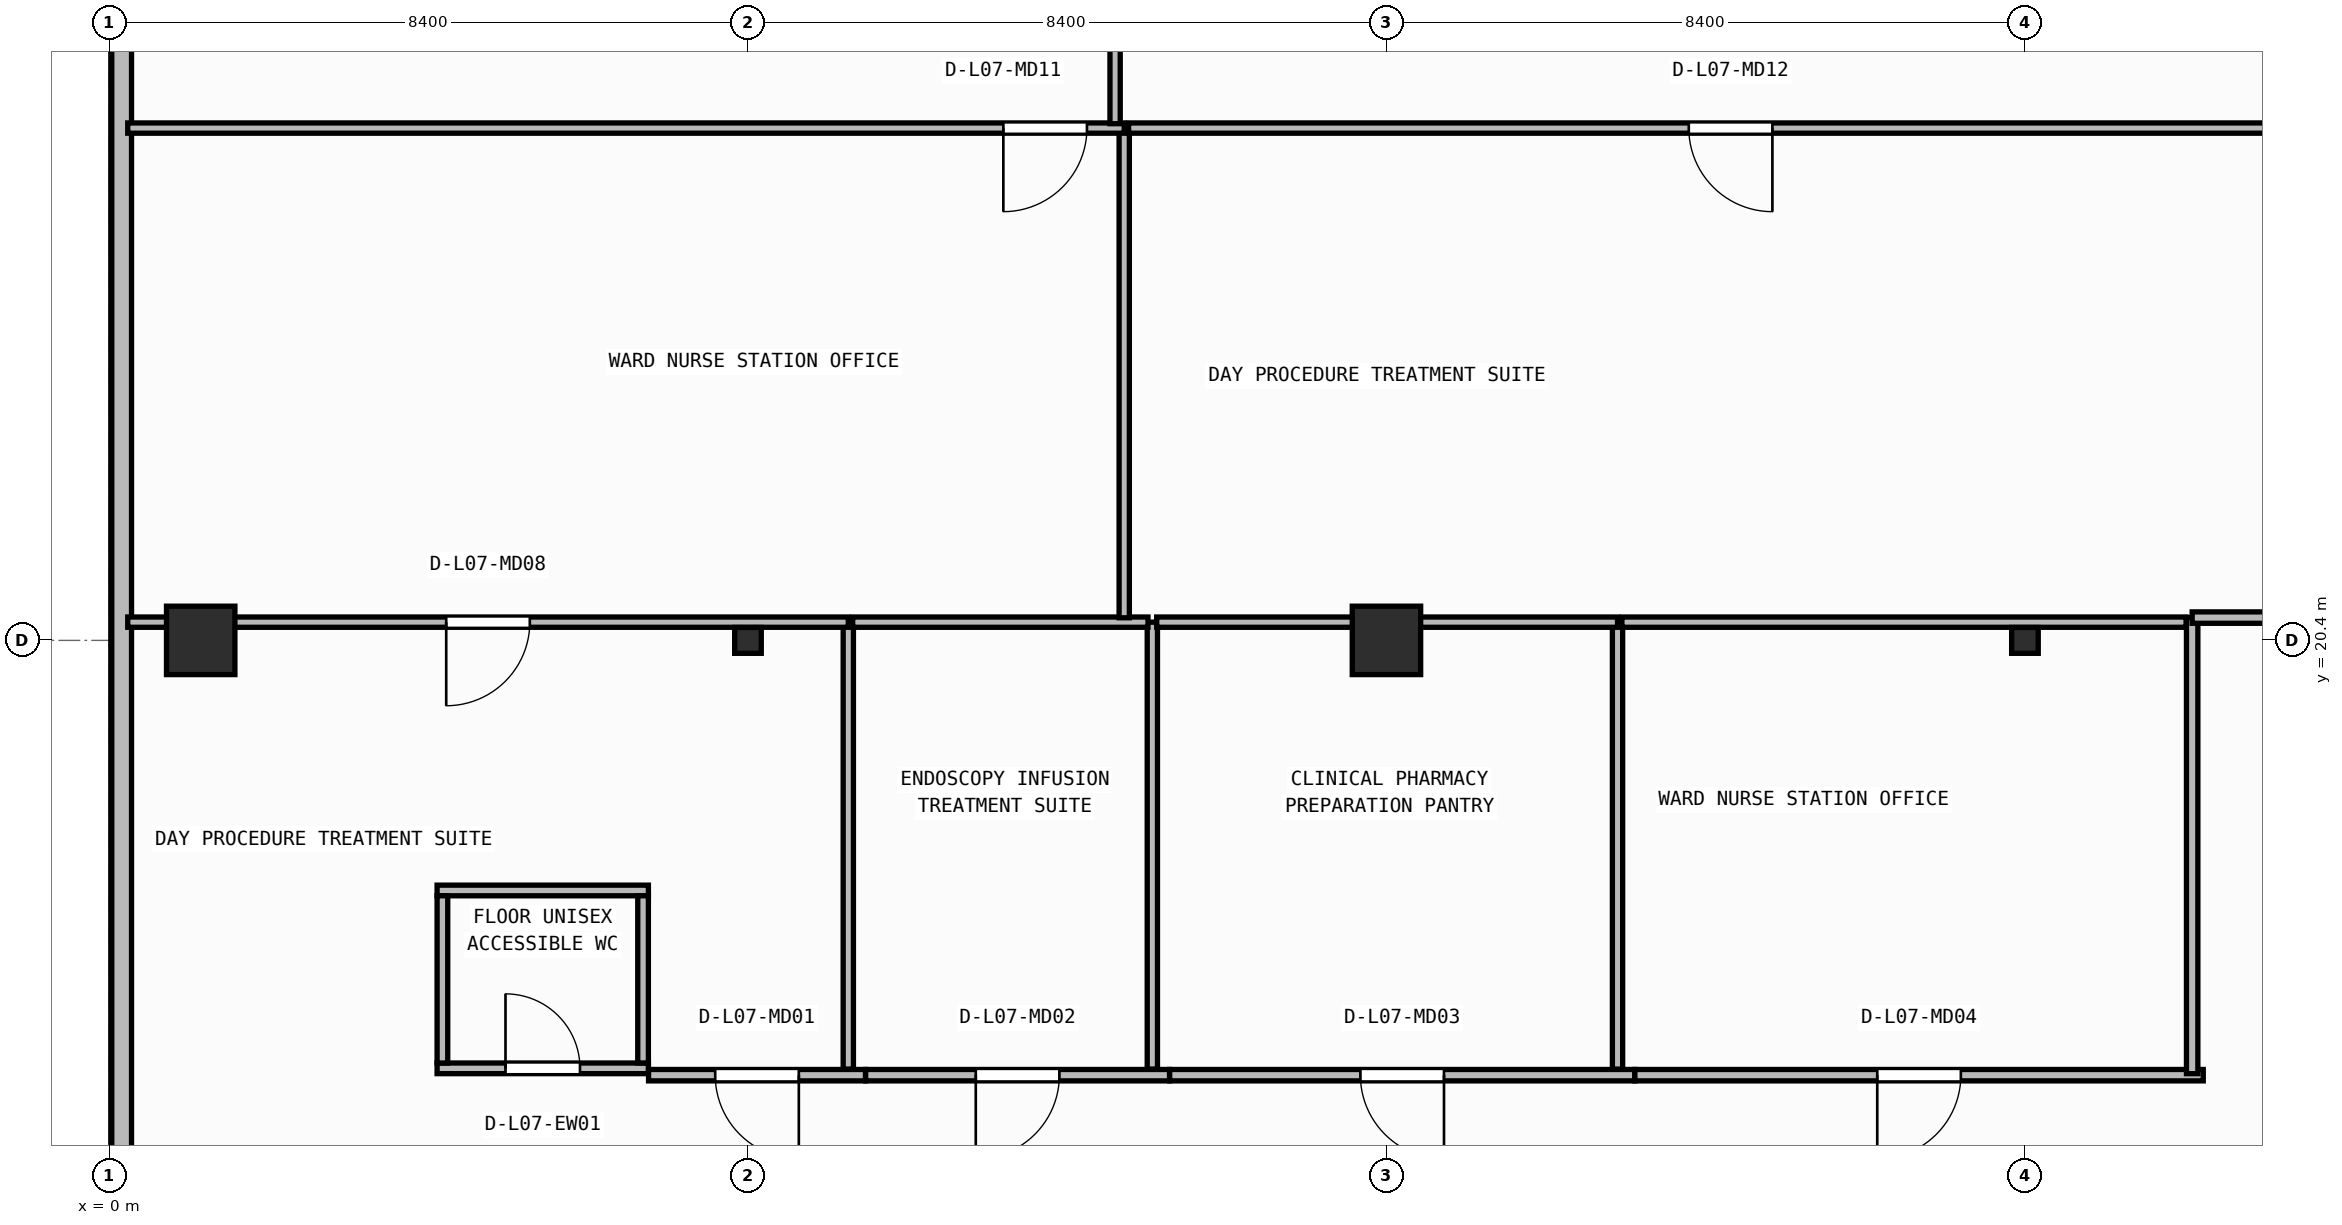
"""IFC4 building model, lengths in metres.
Left out: names, types, materials, properties, quantities, classifications, styles, units other than length and angle.
Written with IfcOpenShell. Run it as: python <this file> out.ifc"""

import sys

from ifc_helpers import new_model, si_unit, direction, frame, frame_2d, origin, origin_2d, place, context, subcontext, project, spatial, rectangle, i_section, extrude, element, fill, save


model = new_model("IFC4")
c1 = context("Model", 3, precision=1e-05, world=origin(), true_north=direction((0.0, 1.0)))
c2 = subcontext(c1, "Body", "Model", "MODEL_VIEW")
j1 = project(units=[si_unit("LENGTHUNIT", "METRE"), si_unit("PLANEANGLEUNIT", "RADIAN")], contexts=[c1])
p1 = place(None, origin())
s1 = spatial("IfcSite", under=j1, at=p1, CompositionType="ELEMENT")
p2 = place(p1, origin())
s2 = spatial("IfcBuilding", under=s1, at=p2, CompositionType="ELEMENT")
p3 = place(p2, frame((0.0, 0.0, 30.4)))
s3 = spatial("IfcBuildingStorey", under=s2, at=p3, CompositionType="ELEMENT", Elevation=30.4)
p4 = place(p3, frame((1.2, 20.4, 0.0), z_axis=(0.0, 0.0, 1.0), x_axis=(1.0, 0.0, 0.0)))
e1 = element("IfcColumn", 1, at=p4, inside=s3, PredefinedType="COLUMN", context=c2, shape_type="SweptSolid", body=[
    extrude(rectangle(XDim=0.9, YDim=0.9, at=origin_2d()), origin(), (0.0, 0.0, 1.0), 3.95),
])
p5 = place(p3, frame((8.4, 20.4, 0.0), z_axis=(0.0, 0.0, 1.0), x_axis=(1.0, 0.0, 0.0)))
e2 = element("IfcColumn", 2, at=p5, inside=s3, PredefinedType="COLUMN", context=c2, shape_type="SweptSolid", body=[
    extrude(i_section(OverallWidth=0.35, OverallDepth=0.34, WebThickness=0.016, FlangeThickness=0.028, at=origin_2d()), origin(), (0.0, 0.0, 1.0), 3.95),
])
p6 = place(p3, frame((16.8, 20.4, 0.0), z_axis=(0.0, 0.0, 1.0), x_axis=(1.0, 0.0, 0.0)))
e3 = element("IfcColumn", 3, at=p6, inside=s3, PredefinedType="COLUMN", context=c2, shape_type="SweptSolid", body=[
    extrude(rectangle(XDim=0.9, YDim=0.9, at=origin_2d()), origin(), (0.0, 0.0, 1.0), 3.95),
])
p7 = place(p3, frame((25.2, 20.4, 0.0), z_axis=(0.0, 0.0, 1.0), x_axis=(1.0, 0.0, 0.0)))
e4 = element("IfcColumn", 4, at=p7, inside=s3, PredefinedType="COLUMN", context=c2, shape_type="SweptSolid", body=[
    extrude(i_section(OverallWidth=0.35, OverallDepth=0.34, WebThickness=0.016, FlangeThickness=0.028, at=origin_2d()), origin(), (0.0, 0.0, 1.0), 3.95),
])
p8 = place(p3, frame((0.16, 41.04, 0.0), z_axis=(0.0, 0.0, 1.0), x_axis=(0.0, -1.0, 0.0)))
e5 = element("IfcWall", 5, at=p8, inside=s3, PredefinedType="STANDARD", context=c2, shape_type="SweptSolid", body=[
    extrude(rectangle(XDim=38.28, YDim=0.26, at=frame_2d((19.14, 0.0))), origin(), (0.0, 0.0, 1.0), 3.71),
])
p9 = place(p8, frame((28.15, 0.0, 0.9)))
e6 = element("IfcOpeningElement", 6, at=p9, cuts=e5, PredefinedType="OPENING", context=c2, shape_type="SweptSolid", body=[
    extrude(rectangle(XDim=2.4, YDim=1.65, at=frame_2d((1.2, 0.825))), frame((0.0, 0.14, 0.0), z_axis=(0.0, -1.0, 0.0), x_axis=(1.0, 0.0, 0.0)), (0.0, 0.0, 1.0), 0.28),
])
p10 = place(p3, frame((4.31, 14.77, 0.0), z_axis=(0.0, 0.0, 1.0), x_axis=(1.0, 0.0, 0.0)))
e7 = element("IfcWall", 7, at=p10, inside=s3, PredefinedType="PARTITIONING", context=c2, shape_type="SweptSolid", body=[
    extrude(rectangle(XDim=2.78, YDim=0.14, at=frame_2d((1.39, 0.0))), origin(), (0.0, 0.0, 1.0), 3.71),
])
p11 = place(p10, frame((0.9, 0.0, 0.0)))
e8 = element("IfcOpeningElement", 8, at=p11, cuts=e7, PredefinedType="OPENING", context=c2, shape_type="SweptSolid", body=[
    extrude(rectangle(XDim=0.98, YDim=2.1, at=frame_2d((0.49, 1.05))), frame((0.0, 0.08, 0.0), z_axis=(0.0, -1.0, 0.0), x_axis=(1.0, 0.0, 0.0)), (0.0, 0.0, 1.0), 0.16),
])
p12 = place(p3, frame((4.31, 17.11, 0.0), z_axis=(0.0, 0.0, 1.0), x_axis=(1.0, 0.0, 0.0)))
e9 = element("IfcWall", 9, at=p12, inside=s3, PredefinedType="PARTITIONING", context=c2, shape_type="SweptSolid", body=[
    extrude(rectangle(XDim=2.78, YDim=0.14, at=frame_2d((1.39, 0.0))), origin(), (0.0, 0.0, 1.0), 3.71),
])
for number, where, z_axis, x_axis in (
    (10, (4.38, 14.84, 0.0), (0.0, 0.0, 1.0), (0.0, 1.0, 0.0)),
    (11, (7.02, 14.84, 0.0), (0.0, 0.0, 1.0), (0.0, 1.0, 0.0)),
):
    element("IfcWall", number, at=place(p3, frame(where, z_axis=z_axis, x_axis=x_axis)), inside=s3, PredefinedType="PARTITIONING", context=c2, shape_type="SweptSolid", body=[
        extrude(rectangle(XDim=2.2, YDim=0.14, at=frame_2d((1.1, 0.0))), origin(), (0.0, 0.0, 1.0), 3.71),
    ])
p13 = place(p3, frame((9.946, 14.68, 0.0), z_axis=(0.0, 0.0, 1.0), x_axis=(-1.0, 0.0, 0.0)))
e12 = element("IfcWall", 12, at=p13, inside=s3, PredefinedType="PARTITIONING", context=c2, shape_type="SweptSolid", body=[
    extrude(rectangle(XDim=2.854, YDim=0.15, at=frame_2d((1.427, 0.0))), origin(), (0.0, 0.0, 1.0), 3.71),
])
p14 = place(p13, frame((0.877, 0.0, 0.0)))
e13 = element("IfcOpeningElement", 13, at=p14, cuts=e12, PredefinedType="OPENING", context=c2, shape_type="SweptSolid", body=[
    extrude(rectangle(XDim=1.1, YDim=2.1, at=frame_2d((0.55, 1.05))), frame((0.0, 0.085, 0.0), z_axis=(0.0, -1.0, 0.0), x_axis=(1.0, 0.0, 0.0)), (0.0, 0.0, 1.0), 0.17),
])
p15 = place(p3, frame((13.946, 14.68, 0.0), z_axis=(0.0, 0.0, 1.0), x_axis=(-1.0, 0.0, 0.0)))
e14 = element("IfcWall", 14, at=p15, inside=s3, PredefinedType="PARTITIONING", context=c2, shape_type="SweptSolid", body=[
    extrude(rectangle(XDim=3.998, YDim=0.15, at=frame_2d((1.999, 0.0))), origin(), (0.0, 0.0, 1.0), 3.71),
])
p16 = place(p15, frame((1.449, 0.0, 0.0)))
e15 = element("IfcOpeningElement", 15, at=p16, cuts=e14, PredefinedType="OPENING", context=c2, shape_type="SweptSolid", body=[
    extrude(rectangle(XDim=1.1, YDim=2.1, at=frame_2d((0.55, 1.05))), frame((0.0, 0.085, 0.0), z_axis=(0.0, -1.0, 0.0), x_axis=(1.0, 0.0, 0.0)), (0.0, 0.0, 1.0), 0.17),
])
p17 = place(p3, frame((20.066, 14.68, 0.0), z_axis=(0.0, 0.0, 1.0), x_axis=(-1.0, 0.0, 0.0)))
e16 = element("IfcWall", 16, at=p17, inside=s3, PredefinedType="PARTITIONING", context=c2, shape_type="SweptSolid", body=[
    extrude(rectangle(XDim=6.118, YDim=0.15, at=frame_2d((3.059, 0.0))), origin(), (0.0, 0.0, 1.0), 3.71),
])
p18 = place(p17, frame((2.509, 0.0, 0.0)))
e17 = element("IfcOpeningElement", 17, at=p18, cuts=e16, PredefinedType="OPENING", context=c2, shape_type="SweptSolid", body=[
    extrude(rectangle(XDim=1.1, YDim=2.1, at=frame_2d((0.55, 1.05))), frame((0.0, 0.085, 0.0), z_axis=(0.0, -1.0, 0.0), x_axis=(1.0, 0.0, 0.0)), (0.0, 0.0, 1.0), 0.17),
])
p19 = place(p3, frame((27.546, 14.68, 0.0), z_axis=(0.0, 0.0, 1.0), x_axis=(-1.0, 0.0, 0.0)))
e18 = element("IfcWall", 18, at=p19, inside=s3, PredefinedType="PARTITIONING", context=c2, shape_type="SweptSolid", body=[
    extrude(rectangle(XDim=7.478, YDim=0.15, at=frame_2d((3.739, 0.0))), origin(), (0.0, 0.0, 1.0), 3.71),
])
p20 = place(p19, frame((3.189, 0.0, 0.0)))
e19 = element("IfcOpeningElement", 19, at=p20, cuts=e18, PredefinedType="OPENING", context=c2, shape_type="SweptSolid", body=[
    extrude(rectangle(XDim=1.1, YDim=2.1, at=frame_2d((0.55, 1.05))), frame((0.0, 0.085, 0.0), z_axis=(0.0, -1.0, 0.0), x_axis=(1.0, 0.0, 0.0)), (0.0, 0.0, 1.0), 0.17),
])
p21 = place(p3, frame((27.4, 20.7, 0.0), z_axis=(0.0, 0.0, 1.0), x_axis=(0.0, -1.0, 0.0)))
e20 = element("IfcWall", 20, at=p21, inside=s3, PredefinedType="PARTITIONING", context=c2, shape_type="SweptSolid", body=[
    extrude(rectangle(XDim=6.0, YDim=0.15, at=frame_2d((3.0, 0.0))), origin(), (0.0, 0.0, 1.0), 3.71),
])
p22 = place(p3, frame((29.9, 20.7, 0.0), z_axis=(0.0, 0.0, 1.0), x_axis=(-1.0, 0.0, 0.0)))
e21 = element("IfcWall", 21, at=p22, inside=s3, PredefinedType="PARTITIONING", context=c2, shape_type="SweptSolid", body=[
    extrude(rectangle(XDim=2.5, YDim=0.15, at=frame_2d((1.25, 0.0))), origin(), (0.0, 0.0, 1.0), 3.073),
])
p23 = place(p22, frame((0.225, 0.0, 0.0)))
e22 = element("IfcOpeningElement", 22, at=p23, cuts=e21, PredefinedType="OPENING", context=c2, shape_type="SweptSolid", body=[
    extrude(rectangle(XDim=1.1, YDim=2.1, at=frame_2d((0.55, 1.05))), frame((0.0, 0.085, 0.0), z_axis=(0.0, -1.0, 0.0), x_axis=(1.0, 0.0, 0.0)), (0.0, 0.0, 1.0), 0.17),
])
p24 = place(p3, frame((9.72, 14.76, 0.0), z_axis=(0.0, 0.0, 1.0), x_axis=(0.0, 1.0, 0.0)))
e23 = element("IfcWall", 23, at=p24, inside=s3, PredefinedType="PARTITIONING", context=c2, shape_type="SweptSolid", body=[
    extrude(rectangle(XDim=5.88, YDim=0.135, at=frame_2d((2.94, 0.0))), origin(), (0.0, 0.0, 1.0), 3.71),
])
p25 = place(p3, frame((9.72, 20.64, 0.0), z_axis=(0.0, 0.0, 1.0), x_axis=(-1.0, 0.0, 0.0)))
e24 = element("IfcWall", 24, at=p25, inside=s3, PredefinedType="PARTITIONING", context=c2, shape_type="SweptSolid", body=[
    extrude(rectangle(XDim=9.48, YDim=0.135, at=frame_2d((4.74, 0.0))), origin(), (0.0, 0.0, 1.0), 3.073),
])
p26 = place(p25, frame((4.19, 0.0, 0.0)))
e25 = element("IfcOpeningElement", 25, at=p26, cuts=e24, PredefinedType="OPENING", context=c2, shape_type="SweptSolid", body=[
    extrude(rectangle(XDim=1.1, YDim=2.1, at=frame_2d((0.55, 1.05))), frame((0.0, 0.077, 0.0), z_axis=(0.0, -1.0, 0.0), x_axis=(1.0, 0.0, 0.0)), (0.0, 0.0, 1.0), 0.155),
])
p27 = place(p3, frame((13.72, 14.76, 0.0), z_axis=(0.0, 0.0, 1.0), x_axis=(0.0, 1.0, 0.0)))
e26 = element("IfcWall", 26, at=p27, inside=s3, PredefinedType="PARTITIONING", context=c2, shape_type="SweptSolid", body=[
    extrude(rectangle(XDim=5.88, YDim=0.135, at=frame_2d((2.94, 0.0))), origin(), (0.0, 0.0, 1.0), 3.71),
])
p28 = place(p3, frame((13.663, 20.64, 0.0), z_axis=(0.0, 0.0, 1.0), x_axis=(-1.0, 0.0, 0.0)))
e27 = element("IfcWall", 27, at=p28, inside=s3, PredefinedType="PARTITIONING", context=c2, shape_type="SweptSolid", body=[
    extrude(rectangle(XDim=3.885, YDim=0.135, at=frame_2d((1.942, 0.0))), origin(), (0.0, 0.0, 1.0), 3.073),
])
p29 = place(p3, frame((19.84, 14.76, 0.0), z_axis=(0.0, 0.0, 1.0), x_axis=(0.0, 1.0, 0.0)))
e28 = element("IfcWall", 28, at=p29, inside=s3, PredefinedType="PARTITIONING", context=c2, shape_type="SweptSolid", body=[
    extrude(rectangle(XDim=5.88, YDim=0.135, at=frame_2d((2.94, 0.0))), origin(), (0.0, 0.0, 1.0), 3.71),
])
p30 = place(p3, frame((19.84, 20.64, 0.0), z_axis=(0.0, 0.0, 1.0), x_axis=(-1.0, 0.0, 0.0)))
e29 = element("IfcWall", 29, at=p30, inside=s3, PredefinedType="PARTITIONING", context=c2, shape_type="SweptSolid", body=[
    extrude(rectangle(XDim=6.062, YDim=0.135, at=frame_2d((3.031, 0.0))), origin(), (0.0, 0.0, 1.0), 3.073),
])
p31 = place(p3, frame((27.32, 20.64, 0.0), z_axis=(0.0, 0.0, 1.0), x_axis=(-1.0, 0.0, 0.0)))
e30 = element("IfcWall", 30, at=p31, inside=s3, PredefinedType="PARTITIONING", context=c2, shape_type="SweptSolid", body=[
    extrude(rectangle(XDim=7.423, YDim=0.135, at=frame_2d((3.711, 0.0))), origin(), (0.0, 0.0, 1.0), 3.073),
])
p32 = place(p3, frame((13.35, 20.698, 0.0), z_axis=(0.0, 0.0, 1.0), x_axis=(0.0, 1.0, 0.0)))
e31 = element("IfcWall", 31, at=p32, inside=s3, PredefinedType="PARTITIONING", context=c2, shape_type="SweptSolid", body=[
    extrude(rectangle(XDim=6.442, YDim=0.135, at=frame_2d((3.221, 0.0))), origin(), (0.0, 0.0, 1.0), 3.71),
])
p33 = place(p3, frame((13.35, 27.14, 0.0), z_axis=(0.0, 0.0, 1.0), x_axis=(-1.0, 0.0, 0.0)))
e32 = element("IfcWall", 32, at=p33, inside=s3, PredefinedType="PARTITIONING", context=c2, shape_type="SweptSolid", body=[
    extrude(rectangle(XDim=13.11, YDim=0.135, at=frame_2d((6.555, 0.0))), origin(), (0.0, 0.0, 1.0), 3.71),
])
p34 = place(p33, frame((0.49, 0.0, 0.0)))
e33 = element("IfcOpeningElement", 33, at=p34, cuts=e32, PredefinedType="OPENING", context=c2, shape_type="SweptSolid", body=[
    extrude(rectangle(XDim=1.1, YDim=2.1, at=frame_2d((0.55, 1.05))), frame((0.0, 0.077, 0.0), z_axis=(0.0, -1.0, 0.0), x_axis=(1.0, 0.0, 0.0)), (0.0, 0.0, 1.0), 0.155),
])
p35 = place(p3, frame((29.248, 27.14, 0.0), z_axis=(0.0, 0.0, 1.0), x_axis=(-1.0, 0.0, 0.0)))
e34 = element("IfcWall", 34, at=p35, inside=s3, PredefinedType="PARTITIONING", context=c2, shape_type="SweptSolid", body=[
    extrude(rectangle(XDim=15.84, YDim=0.135, at=frame_2d((7.92, 0.0))), origin(), (0.0, 0.0, 1.0), 3.71),
])
p36 = place(p35, frame((7.37, 0.0, 0.0)))
e35 = element("IfcOpeningElement", 35, at=p36, cuts=e34, PredefinedType="OPENING", context=c2, shape_type="SweptSolid", body=[
    extrude(rectangle(XDim=1.1, YDim=2.1, at=frame_2d((0.55, 1.05))), frame((0.0, 0.077, 0.0), z_axis=(0.0, -1.0, 0.0), x_axis=(1.0, 0.0, 0.0)), (0.0, 0.0, 1.0), 0.155),
])
p37 = place(p3, frame((13.23, 27.198, 0.0), z_axis=(0.0, 0.0, 1.0), x_axis=(0.0, 1.0, 0.0)))
e36 = element("IfcWall", 36, at=p37, inside=s3, PredefinedType="PARTITIONING", context=c2, shape_type="SweptSolid", body=[
    extrude(rectangle(XDim=9.536, YDim=0.135, at=frame_2d((4.768, 0.0))), origin(), (0.0, 0.0, 1.0), 3.71),
])
p38 = place(p11, origin())
e37 = element("IfcDoor", 37, at=p38, inside=s3, OperationType="SINGLE_SWING_LEFT", PredefinedType="DOOR", context=c2, shape_type="SweptSolid", body=[
    extrude(rectangle(XDim=0.98, YDim=2.1, at=frame_2d((0.49, 1.05))), frame((0.0, 0.025, 0.0), z_axis=(0.0, -1.0, 0.0), x_axis=(1.0, 0.0, 0.0)), (0.0, 0.0, 1.0), 0.05),
])
fill(e8, e37)
p39 = place(p14, origin())
e38 = element("IfcDoor", 38, at=p39, inside=s3, OperationType="SINGLE_SWING_LEFT", PredefinedType="DOOR", context=c2, shape_type="SweptSolid", body=[
    extrude(rectangle(XDim=1.1, YDim=2.1, at=frame_2d((0.55, 1.05))), frame((0.0, 0.025, 0.0), z_axis=(0.0, -1.0, 0.0), x_axis=(1.0, 0.0, 0.0)), (0.0, 0.0, 1.0), 0.05),
])
fill(e13, e38)
p40 = place(p16, origin())
e39 = element("IfcDoor", 39, at=p40, inside=s3, OperationType="SINGLE_SWING_RIGHT", PredefinedType="DOOR", context=c2, shape_type="SweptSolid", body=[
    extrude(rectangle(XDim=1.1, YDim=2.1, at=frame_2d((0.55, 1.05))), frame((0.0, 0.025, 0.0), z_axis=(0.0, -1.0, 0.0), x_axis=(1.0, 0.0, 0.0)), (0.0, 0.0, 1.0), 0.05),
])
fill(e15, e39)
p41 = place(p18, origin())
e40 = element("IfcDoor", 40, at=p41, inside=s3, OperationType="SINGLE_SWING_LEFT", PredefinedType="DOOR", context=c2, shape_type="SweptSolid", body=[
    extrude(rectangle(XDim=1.1, YDim=2.1, at=frame_2d((0.55, 1.05))), frame((0.0, 0.025, 0.0), z_axis=(0.0, -1.0, 0.0), x_axis=(1.0, 0.0, 0.0)), (0.0, 0.0, 1.0), 0.05),
])
fill(e17, e40)
p42 = place(p20, origin())
e41 = element("IfcDoor", 41, at=p42, inside=s3, OperationType="SINGLE_SWING_RIGHT", PredefinedType="DOOR", context=c2, shape_type="SweptSolid", body=[
    extrude(rectangle(XDim=1.1, YDim=2.1, at=frame_2d((0.55, 1.05))), frame((0.0, 0.025, 0.0), z_axis=(0.0, -1.0, 0.0), x_axis=(1.0, 0.0, 0.0)), (0.0, 0.0, 1.0), 0.05),
])
fill(e19, e41)
p43 = place(p26, origin())
e42 = element("IfcDoor", 42, at=p43, inside=s3, OperationType="SINGLE_SWING_RIGHT", PredefinedType="DOOR", context=c2, shape_type="SweptSolid", body=[
    extrude(rectangle(XDim=1.1, YDim=2.1, at=frame_2d((0.55, 1.05))), frame((0.0, 0.025, 0.0), z_axis=(0.0, -1.0, 0.0), x_axis=(1.0, 0.0, 0.0)), (0.0, 0.0, 1.0), 0.05),
])
fill(e25, e42)
p44 = place(p34, origin())
e43 = element("IfcDoor", 43, at=p44, inside=s3, OperationType="SINGLE_SWING_RIGHT", PredefinedType="DOOR", context=c2, shape_type="SweptSolid", body=[
    extrude(rectangle(XDim=1.1, YDim=2.1, at=frame_2d((0.55, 1.05))), frame((0.0, 0.025, 0.0), z_axis=(0.0, -1.0, 0.0), x_axis=(1.0, 0.0, 0.0)), (0.0, 0.0, 1.0), 0.05),
])
fill(e33, e43)
p45 = place(p36, origin())
e44 = element("IfcDoor", 44, at=p45, inside=s3, OperationType="SINGLE_SWING_LEFT", PredefinedType="DOOR", context=c2, shape_type="SweptSolid", body=[
    extrude(rectangle(XDim=1.1, YDim=2.1, at=frame_2d((0.55, 1.05))), frame((0.0, 0.025, 0.0), z_axis=(0.0, -1.0, 0.0), x_axis=(1.0, 0.0, 0.0)), (0.0, 0.0, 1.0), 0.05),
])
fill(e35, e44)
save(model, sys.argv[1])
